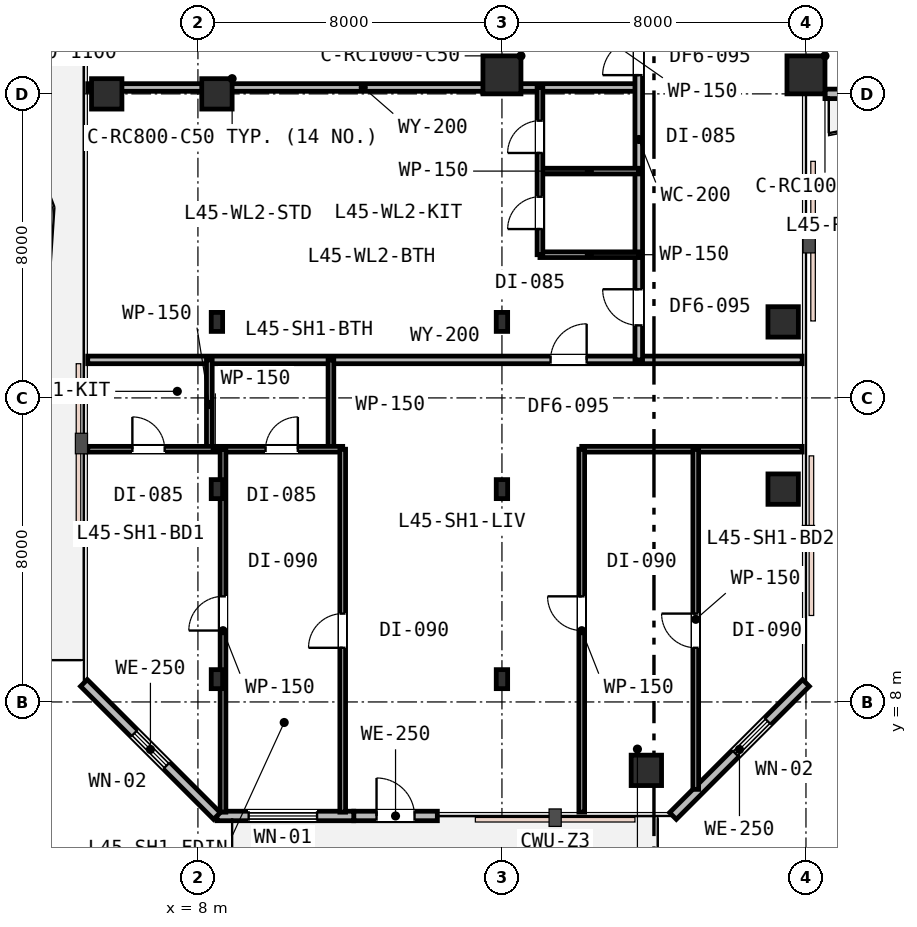
"""IFC4 building model, lengths in metres.
Left out: names, types, materials, properties, quantities, classifications, styles, units other than length and angle.
Written with IfcOpenShell. Run it as: python <this file> out.ifc"""

import sys

from ifc_helpers import new_model, si_unit, direction, frame, frame_2d, origin, origin_2d, place, context, subcontext, project, spatial, rectangle, i_section, extrude, element, fill, save


model = new_model("IFC4")
c1 = context("Model", 3, precision=1e-05, world=origin(), true_north=direction((0.0, 1.0)))
c2 = subcontext(c1, "Body", "Model", "MODEL_VIEW")
j1 = project(units=[si_unit("LENGTHUNIT", "METRE"), si_unit("PLANEANGLEUNIT", "RADIAN")], contexts=[c1])
p1 = place(None, origin())
s1 = spatial("IfcSite", under=j1, at=p1, CompositionType="ELEMENT")
p2 = place(p1, origin())
s2 = spatial("IfcBuilding", under=s1, at=p2, CompositionType="ELEMENT")
p3 = place(p2, frame((0.0, 0.0, 175.8)))
s3 = spatial("IfcBuildingStorey", under=s2, at=p3, CompositionType="ELEMENT", Elevation=175.8)
p4 = place(p3, frame((8.5, 24.0, 0.0), z_axis=(0.0, 0.0, 1.0), x_axis=(1.0, 0.0, 0.0)))
e1 = element("IfcColumn", 1, at=p4, inside=s3, PredefinedType="COLUMN", context=c2, shape_type="SweptSolid", body=[
    extrude(rectangle(XDim=0.8, YDim=0.8, at=origin_2d()), origin(), (0.0, 0.0, 1.0), 3.6),
])
for number, where, z_axis, x_axis in (
    (2, (16.0, 24.5, 0.0), (0.0, 0.0, 1.0), (1.0, 0.0, 0.0)),
    (3, (24.0, 24.5, 0.0), (0.0, 0.0, 1.0), (1.0, 0.0, 0.0)),
):
    element("IfcColumn", number, at=place(p3, frame(where, z_axis=z_axis, x_axis=x_axis)), inside=s3, PredefinedType="COLUMN", context=c2, shape_type="SweptSolid", body=[
        extrude(rectangle(XDim=1.0, YDim=1.0, at=origin_2d()), origin(), (0.0, 0.0, 1.0), 3.6),
    ])
for number, where, z_axis, x_axis in (
    (4, (5.6, 24.0, 0.0), (0.0, 0.0, 1.0), (1.0, 0.0, 0.0)),
    (5, (19.8, 6.2, 0.0), (0.0, 0.0, 1.0), (1.0, 0.0, 0.0)),
    (6, (23.4, 13.6, 0.0), (0.0, 0.0, 1.0), (1.0, 0.0, 0.0)),
    (7, (23.4, 18.0, 0.0), (0.0, 0.0, 1.0), (1.0, 0.0, 0.0)),
):
    element("IfcColumn", number, at=place(p3, frame(where, z_axis=z_axis, x_axis=x_axis)), inside=s3, PredefinedType="COLUMN", context=c2, shape_type="SweptSolid", body=[
        extrude(rectangle(XDim=0.8, YDim=0.8, at=origin_2d()), origin(), (0.0, 0.0, 1.0), 3.6),
    ])
for number, where, z_axis, x_axis in (
    (8, (8.5, 8.6, 0.0), (0.0, 0.0, 1.0), (1.0, 0.0, 0.0)),
    (9, (16.0, 8.6, 0.0), (0.0, 0.0, 1.0), (1.0, 0.0, 0.0)),
    (10, (8.5, 13.6, 0.0), (0.0, 0.0, 1.0), (1.0, 0.0, 0.0)),
    (11, (16.0, 13.6, 0.0), (0.0, 0.0, 1.0), (1.0, 0.0, 0.0)),
    (12, (8.5, 18.0, 0.0), (0.0, 0.0, 1.0), (1.0, 0.0, 0.0)),
    (13, (16.0, 18.0, 0.0), (0.0, 0.0, 1.0), (1.0, 0.0, 0.0)),
):
    element("IfcColumn", number, at=place(p3, frame(where, z_axis=z_axis, x_axis=x_axis)), inside=s3, PredefinedType="COLUMN", context=c2, shape_type="SweptSolid", body=[
        extrude(i_section(OverallWidth=0.3, OverallDepth=0.5, WebThickness=0.015, FlangeThickness=0.028, FilletRadius=0.027, at=origin_2d()), origin(), (0.0, 0.0, 1.0), 3.6),
    ])
p5 = place(p3, frame((12.1, 5.0, 0.0), z_axis=(0.0, 0.0, 1.0), x_axis=(1.0, 0.0, 0.0)))
e14 = element("IfcWall", 14, at=p5, inside=s3, PredefinedType="STANDARD", context=c2, shape_type="SweptSolid", body=[
    extrude(rectangle(XDim=2.2, YDim=0.25, at=frame_2d((1.1, 0.0))), origin(), (0.0, 0.0, 1.0), 3.33),
])
p6 = place(p5, frame((0.6, 0.0, 0.0)))
e15 = element("IfcOpeningElement", 15, at=p6, cuts=e14, PredefinedType="OPENING", context=c2, shape_type="SweptSolid", body=[
    extrude(rectangle(XDim=1.0, YDim=2.15, at=frame_2d((0.5, 1.075))), frame((0.0, 0.135, 0.0), z_axis=(0.0, -1.0, 0.0), x_axis=(1.0, 0.0, 0.0)), (0.0, 0.0, 1.0), 0.27),
])
p7 = place(p3, frame((8.5, 5.0, 0.0), z_axis=(0.0, 0.0, 1.0), x_axis=(1.0, 0.0, 0.0)))
e16 = element("IfcWall", 16, at=p7, inside=s3, PredefinedType="STANDARD", context=c2, shape_type="SweptSolid", body=[
    extrude(rectangle(XDim=3.6, YDim=0.25, at=frame_2d((1.8, 0.0))), origin(), (0.0, 0.0, 1.0), 3.33),
])
p8 = place(p7, frame((0.835, 0.0, 0.75)))
e17 = element("IfcOpeningElement", 17, at=p8, cuts=e16, PredefinedType="OPENING", context=c2, shape_type="SweptSolid", body=[
    extrude(rectangle(XDim=1.8, YDim=1.85, at=frame_2d((0.9, 0.925))), frame((0.0, 0.135, 0.0), z_axis=(0.0, -1.0, 0.0), x_axis=(1.0, 0.0, 0.0)), (0.0, 0.0, 1.0), 0.27),
])
p9 = place(p3, frame((20.5, 5.0, 0.0), z_axis=(0.0, 0.0, 1.0), x_axis=(0.707106781187, 0.707106781187, 0.0)))
e18 = element("IfcWall", 18, at=p9, inside=s3, PredefinedType="STANDARD", context=c2, shape_type="SweptSolid", body=[
    extrude(rectangle(XDim=4.95, YDim=0.25, at=frame_2d((2.475, 0.0))), origin(), (0.0, 0.0, 1.0), 3.33),
])
p10 = place(p9, frame((2.325, 0.0, 0.85)))
e19 = element("IfcOpeningElement", 19, at=p10, cuts=e18, PredefinedType="OPENING", context=c2, shape_type="SweptSolid", body=[
    extrude(rectangle(XDim=1.2, YDim=1.6, at=frame_2d((0.6, 0.8))), frame((0.0, 0.135, 0.0), z_axis=(0.0, -1.0, 0.0), x_axis=(1.0, 0.0, 0.0)), (0.0, 0.0, 1.0), 0.27),
])
p11 = place(p3, frame((24.5, 24.0, 0.0), z_axis=(0.0, 0.0, 1.0), x_axis=(1.0, 0.0, 0.0)))
e20 = element("IfcWall", 20, at=p11, inside=s3, PredefinedType="STANDARD", context=c2, shape_type="SweptSolid", body=[
    extrude(rectangle(XDim=1.35, YDim=0.25, at=frame_2d((0.675, 0.0))), origin(), (0.0, 0.0, 1.0), 3.02),
])
p12 = place(p3, frame((5.0, 8.5, 0.0), z_axis=(0.0, 0.0, 1.0), x_axis=(0.707106781187, -0.707106781187, 0.0)))
e21 = element("IfcWall", 21, at=p12, inside=s3, PredefinedType="STANDARD", context=c2, shape_type="SweptSolid", body=[
    extrude(rectangle(XDim=4.95, YDim=0.25, at=frame_2d((2.475, 0.0))), origin(), (0.0, 0.0, 1.0), 3.33),
])
p13 = place(p12, frame((1.875, 0.0, 0.85)))
e22 = element("IfcOpeningElement", 22, at=p13, cuts=e21, PredefinedType="OPENING", context=c2, shape_type="SweptSolid", body=[
    extrude(rectangle(XDim=1.2, YDim=1.6, at=frame_2d((0.6, 0.8))), frame((0.0, 0.135, 0.0), z_axis=(0.0, -1.0, 0.0), x_axis=(1.0, 0.0, 0.0)), (0.0, 0.0, 1.0), 0.27),
])
p14 = place(p3, frame((5.1, 17.0, 0.0), z_axis=(0.0, 0.0, 1.0), x_axis=(1.0, 0.0, 0.0)))
e23 = element("IfcWall", 23, at=p14, inside=s3, PredefinedType="PARTITIONING", context=c2, shape_type="SweptSolid", body=[
    extrude(rectangle(XDim=18.8, YDim=0.2, at=frame_2d((9.4, 0.0))), origin(), (0.0, 0.0, 1.0), 2.92),
])
p15 = place(p14, frame((12.179, 0.0, 0.0)))
e24 = element("IfcOpeningElement", 24, at=p15, cuts=e23, PredefinedType="OPENING", context=c2, shape_type="SweptSolid", body=[
    extrude(rectangle(XDim=0.95, YDim=2.15, at=frame_2d((0.475, 1.075))), frame((0.0, 0.11, 0.0), z_axis=(0.0, -1.0, 0.0), x_axis=(1.0, 0.0, 0.0)), (0.0, 0.0, 1.0), 0.22),
])
p16 = place(p3, frame((5.1, 24.168, 0.0), z_axis=(0.0, 0.0, 1.0), x_axis=(1.0, 0.0, 0.0)))
e25 = element("IfcWall", 25, at=p16, inside=s3, PredefinedType="PARTITIONING", context=c2, shape_type="SweptSolid", body=[
    extrude(rectangle(XDim=14.5, YDim=0.2, at=frame_2d((7.25, 0.0))), origin(), (0.0, 0.0, 1.0), 2.92),
])
p17 = place(p3, frame((19.6, 17.0, 0.0), z_axis=(0.0, 0.0, 1.0), x_axis=(0.0, 1.0, 0.0)))
e26 = element("IfcWall", 26, at=p17, inside=s3, PredefinedType="PARTITIONING", context=c2, shape_type="SweptSolid", body=[
    extrude(rectangle(XDim=11.6, YDim=0.2, at=frame_2d((5.8, 0.0))), origin(), (0.0, 0.0, 1.0), 2.92),
])
p18 = place(p17, frame((7.493, 0.0, 0.0)))
e27 = element("IfcOpeningElement", 27, at=p18, cuts=e26, PredefinedType="OPENING", context=c2, shape_type="SweptSolid", body=[
    extrude(rectangle(XDim=0.95, YDim=2.15, at=frame_2d((0.475, 1.075))), frame((0.0, 0.11, 0.0), z_axis=(0.0, -1.0, 0.0), x_axis=(1.0, 0.0, 0.0)), (0.0, 0.0, 1.0), 0.22),
])
p19 = place(p17, frame((0.909, 0.0, 0.0)))
e28 = element("IfcOpeningElement", 28, at=p19, cuts=e26, PredefinedType="OPENING", context=c2, shape_type="SweptSolid", body=[
    extrude(rectangle(XDim=0.95, YDim=2.15, at=frame_2d((0.475, 1.075))), frame((0.0, 0.11, 0.0), z_axis=(0.0, -1.0, 0.0), x_axis=(1.0, 0.0, 0.0)), (0.0, 0.0, 1.0), 0.22),
])
for number, where, z_axis, x_axis in (
    (29, (17.0, 19.768, 0.0), (0.0, 0.0, 1.0), (1.0, 0.0, 0.0)),
    (30, (17.0, 21.968, 0.0), (0.0, 0.0, 1.0), (1.0, 0.0, 0.0)),
):
    element("IfcWall", number, at=place(p3, frame(where, z_axis=z_axis, x_axis=x_axis)), inside=s3, PredefinedType="PARTITIONING", context=c2, shape_type="SweptSolid", body=[
        extrude(rectangle(XDim=2.6, YDim=0.15, at=frame_2d((1.3, 0.0))), origin(), (0.0, 0.0, 1.0), 3.33),
    ])
p20 = place(p3, frame((17.0, 19.768, 0.0), z_axis=(0.0, 0.0, 1.0), x_axis=(0.0, 1.0, 0.0)))
e31 = element("IfcWall", 31, at=p20, inside=s3, PredefinedType="PARTITIONING", context=c2, shape_type="SweptSolid", body=[
    extrude(rectangle(XDim=4.4, YDim=0.15, at=frame_2d((2.2, 0.0))), origin(), (0.0, 0.0, 1.0), 2.92),
])
p21 = place(p20, frame((0.675, 0.0, 0.0)))
e32 = element("IfcOpeningElement", 32, at=p21, cuts=e31, PredefinedType="OPENING", context=c2, shape_type="SweptSolid", body=[
    extrude(rectangle(XDim=0.85, YDim=2.15, at=frame_2d((0.425, 1.075))), frame((0.0, 0.085, 0.0), z_axis=(0.0, -1.0, 0.0), x_axis=(1.0, 0.0, 0.0)), (0.0, 0.0, 1.0), 0.17),
])
p22 = place(p20, frame((2.677, 0.0, 0.0)))
e33 = element("IfcOpeningElement", 33, at=p22, cuts=e31, PredefinedType="OPENING", context=c2, shape_type="SweptSolid", body=[
    extrude(rectangle(XDim=0.85, YDim=2.15, at=frame_2d((0.425, 1.075))), frame((0.0, 0.085, 0.0), z_axis=(0.0, -1.0, 0.0), x_axis=(1.0, 0.0, 0.0)), (0.0, 0.0, 1.0), 0.17),
])
p23 = place(p3, frame((11.5, 14.65, 0.0), z_axis=(0.0, 0.0, 1.0), x_axis=(0.0, 1.0, 0.0)))
e34 = element("IfcWall", 34, at=p23, inside=s3, PredefinedType="PARTITIONING", context=c2, shape_type="SweptSolid", body=[
    extrude(rectangle(XDim=2.35, YDim=0.15, at=frame_2d((1.175, 0.0))), origin(), (0.0, 0.0, 1.0), 3.07),
])
p24 = place(p3, frame((8.3, 14.65, 0.0), z_axis=(0.0, 0.0, 1.0), x_axis=(0.0, 1.0, 0.0)))
e35 = element("IfcWall", 35, at=p24, inside=s3, PredefinedType="PARTITIONING", context=c2, shape_type="SweptSolid", body=[
    extrude(rectangle(XDim=2.35, YDim=0.15, at=frame_2d((1.175, 0.0))), origin(), (0.0, 0.0, 1.0), 2.92),
])
p25 = place(p3, frame((5.1, 14.65, 0.0), z_axis=(0.0, 0.0, 1.0), x_axis=(1.0, 0.0, 0.0)))
e36 = element("IfcWall", 36, at=p25, inside=s3, PredefinedType="PARTITIONING", context=c2, shape_type="SweptSolid", body=[
    extrude(rectangle(XDim=6.71, YDim=0.15, at=frame_2d((3.355, 0.0))), origin(), (0.0, 0.0, 1.0), 2.92),
])
p26 = place(p25, frame((1.175, 0.0, 0.0)))
e37 = element("IfcOpeningElement", 37, at=p26, cuts=e36, PredefinedType="OPENING", context=c2, shape_type="SweptSolid", body=[
    extrude(rectangle(XDim=0.85, YDim=2.15, at=frame_2d((0.425, 1.075))), frame((0.0, 0.085, 0.0), z_axis=(0.0, -1.0, 0.0), x_axis=(1.0, 0.0, 0.0)), (0.0, 0.0, 1.0), 0.17),
])
p27 = place(p25, frame((4.679, 0.0, 0.0)))
e38 = element("IfcOpeningElement", 38, at=p27, cuts=e36, PredefinedType="OPENING", context=c2, shape_type="SweptSolid", body=[
    extrude(rectangle(XDim=0.85, YDim=2.15, at=frame_2d((0.425, 1.075))), frame((0.0, 0.085, 0.0), z_axis=(0.0, -1.0, 0.0), x_axis=(1.0, 0.0, 0.0)), (0.0, 0.0, 1.0), 0.17),
])
p28 = place(p3, frame((18.1, 14.65, 0.0), z_axis=(0.0, 0.0, 1.0), x_axis=(1.0, 0.0, 0.0)))
e39 = element("IfcWall", 39, at=p28, inside=s3, PredefinedType="PARTITIONING", context=c2, shape_type="SweptSolid", body=[
    extrude(rectangle(XDim=5.8, YDim=0.15, at=frame_2d((2.9, 0.0))), origin(), (0.0, 0.0, 1.0), 3.02),
])
p29 = place(p3, frame((8.66, 5.1, 0.0), z_axis=(0.0, 0.0, 1.0), x_axis=(0.0, 1.0, 0.0)))
e40 = element("IfcWall", 40, at=p29, inside=s3, PredefinedType="PARTITIONING", context=c2, shape_type="SweptSolid", body=[
    extrude(rectangle(XDim=9.55, YDim=0.15, at=frame_2d((4.775, 0.0))), origin(), (0.0, 0.0, 1.0), 2.92),
])
p30 = place(p29, frame((4.779, 0.0, 0.0)))
e41 = element("IfcOpeningElement", 41, at=p30, cuts=e40, PredefinedType="OPENING", context=c2, shape_type="SweptSolid", body=[
    extrude(rectangle(XDim=0.9, YDim=2.15, at=frame_2d((0.45, 1.075))), frame((0.0, 0.085, 0.0), z_axis=(0.0, -1.0, 0.0), x_axis=(1.0, 0.0, 0.0)), (0.0, 0.0, 1.0), 0.17),
])
p31 = place(p3, frame((21.1, 5.7, 0.0), z_axis=(0.0, 0.0, 1.0), x_axis=(0.0, 1.0, 0.0)))
e42 = element("IfcWall", 42, at=p31, inside=s3, PredefinedType="PARTITIONING", context=c2, shape_type="SweptSolid", body=[
    extrude(rectangle(XDim=8.95, YDim=0.15, at=frame_2d((4.475, 0.0))), origin(), (0.0, 0.0, 1.0), 2.92),
])
p32 = place(p31, frame((3.725, 0.0, 0.0)))
e43 = element("IfcOpeningElement", 43, at=p32, cuts=e42, PredefinedType="OPENING", context=c2, shape_type="SweptSolid", body=[
    extrude(rectangle(XDim=0.9, YDim=2.15, at=frame_2d((0.45, 1.075))), frame((0.0, 0.085, 0.0), z_axis=(0.0, -1.0, 0.0), x_axis=(1.0, 0.0, 0.0)), (0.0, 0.0, 1.0), 0.17),
])
p33 = place(p3, frame((18.1, 5.1, 0.0), z_axis=(0.0, 0.0, 1.0), x_axis=(0.0, 1.0, 0.0)))
e44 = element("IfcWall", 44, at=p33, inside=s3, PredefinedType="PARTITIONING", context=c2, shape_type="SweptSolid", body=[
    extrude(rectangle(XDim=9.55, YDim=0.15, at=frame_2d((4.775, 0.0))), origin(), (0.0, 0.0, 1.0), 2.92),
])
p34 = place(p33, frame((4.779, 0.0, 0.0)))
e45 = element("IfcOpeningElement", 45, at=p34, cuts=e44, PredefinedType="OPENING", context=c2, shape_type="SweptSolid", body=[
    extrude(rectangle(XDim=0.9, YDim=2.15, at=frame_2d((0.45, 1.075))), frame((0.0, 0.085, 0.0), z_axis=(0.0, -1.0, 0.0), x_axis=(1.0, 0.0, 0.0)), (0.0, 0.0, 1.0), 0.17),
])
p35 = place(p3, frame((11.81, 5.1, 0.0), z_axis=(0.0, 0.0, 1.0), x_axis=(0.0, 1.0, 0.0)))
e46 = element("IfcWall", 46, at=p35, inside=s3, PredefinedType="PARTITIONING", context=c2, shape_type="SweptSolid", body=[
    extrude(rectangle(XDim=9.55, YDim=0.15, at=frame_2d((4.775, 0.0))), origin(), (0.0, 0.0, 1.0), 2.92),
])
p36 = place(p35, frame((4.325, 0.0, 0.0)))
e47 = element("IfcOpeningElement", 47, at=p36, cuts=e46, PredefinedType="OPENING", context=c2, shape_type="SweptSolid", body=[
    extrude(rectangle(XDim=0.9, YDim=2.15, at=frame_2d((0.45, 1.075))), frame((0.0, 0.085, 0.0), z_axis=(0.0, -1.0, 0.0), x_axis=(1.0, 0.0, 0.0)), (0.0, 0.0, 1.0), 0.17),
])
p37 = place(p6, origin())
e48 = element("IfcDoor", 48, at=p37, inside=s3, OperationType="SINGLE_SWING_LEFT", PredefinedType="DOOR", context=c2, shape_type="SweptSolid", body=[
    extrude(rectangle(XDim=1.0, YDim=2.15, at=frame_2d((0.5, 1.075))), frame((0.0, 0.025, 0.0), z_axis=(0.0, -1.0, 0.0), x_axis=(1.0, 0.0, 0.0)), (0.0, 0.0, 1.0), 0.05),
])
fill(e15, e48)
p38 = place(p8, origin())
e49 = element("IfcWindow", 49, at=p38, inside=s3, PartitioningType="SINGLE_PANEL", PredefinedType="WINDOW", context=c2, shape_type="SweptSolid", body=[
    extrude(rectangle(XDim=1.8, YDim=1.85, at=frame_2d((0.9, 0.925))), frame((0.0, 0.03, 0.0), z_axis=(0.0, -1.0, 0.0), x_axis=(1.0, 0.0, 0.0)), (0.0, 0.0, 1.0), 0.06),
])
fill(e17, e49)
p39 = place(p10, origin())
e50 = element("IfcWindow", 50, at=p39, inside=s3, PartitioningType="SINGLE_PANEL", PredefinedType="WINDOW", context=c2, shape_type="SweptSolid", body=[
    extrude(rectangle(XDim=1.2, YDim=1.6, at=frame_2d((0.6, 0.8))), frame((0.0, 0.03, 0.0), z_axis=(0.0, -1.0, 0.0), x_axis=(1.0, 0.0, 0.0)), (0.0, 0.0, 1.0), 0.06),
])
fill(e19, e50)
p40 = place(p13, origin())
e51 = element("IfcWindow", 51, at=p40, inside=s3, PartitioningType="SINGLE_PANEL", PredefinedType="WINDOW", context=c2, shape_type="SweptSolid", body=[
    extrude(rectangle(XDim=1.2, YDim=1.6, at=frame_2d((0.6, 0.8))), frame((0.0, 0.03, 0.0), z_axis=(0.0, -1.0, 0.0), x_axis=(1.0, 0.0, 0.0)), (0.0, 0.0, 1.0), 0.06),
])
fill(e22, e51)
p41 = place(p18, origin())
e52 = element("IfcDoor", 52, at=p41, inside=s3, OperationType="SINGLE_SWING_LEFT", PredefinedType="DOOR", context=c2, shape_type="SweptSolid", body=[
    extrude(rectangle(XDim=0.95, YDim=2.15, at=frame_2d((0.475, 1.075))), frame((0.0, 0.025, 0.0), z_axis=(0.0, -1.0, 0.0), x_axis=(1.0, 0.0, 0.0)), (0.0, 0.0, 1.0), 0.05),
])
fill(e27, e52)
p42 = place(p19, origin())
e53 = element("IfcDoor", 53, at=p42, inside=s3, OperationType="SINGLE_SWING_RIGHT", PredefinedType="DOOR", context=c2, shape_type="SweptSolid", body=[
    extrude(rectangle(XDim=0.95, YDim=2.15, at=frame_2d((0.475, 1.075))), frame((0.0, 0.025, 0.0), z_axis=(0.0, -1.0, 0.0), x_axis=(1.0, 0.0, 0.0)), (0.0, 0.0, 1.0), 0.05),
])
fill(e28, e53)
p43 = place(p21, origin())
e54 = element("IfcDoor", 54, at=p43, inside=s3, OperationType="SINGLE_SWING_LEFT", PredefinedType="DOOR", context=c2, shape_type="SweptSolid", body=[
    extrude(rectangle(XDim=0.85, YDim=2.15, at=frame_2d((0.425, 1.075))), frame((0.0, 0.025, 0.0), z_axis=(0.0, -1.0, 0.0), x_axis=(1.0, 0.0, 0.0)), (0.0, 0.0, 1.0), 0.05),
])
fill(e32, e54)
p44 = place(p22, origin())
e55 = element("IfcDoor", 55, at=p44, inside=s3, OperationType="SINGLE_SWING_LEFT", PredefinedType="DOOR", context=c2, shape_type="SweptSolid", body=[
    extrude(rectangle(XDim=0.85, YDim=2.15, at=frame_2d((0.425, 1.075))), frame((0.0, 0.025, 0.0), z_axis=(0.0, -1.0, 0.0), x_axis=(1.0, 0.0, 0.0)), (0.0, 0.0, 1.0), 0.05),
])
fill(e33, e55)
p45 = place(p15, origin())
e56 = element("IfcDoor", 56, at=p45, inside=s3, OperationType="SINGLE_SWING_RIGHT", PredefinedType="DOOR", context=c2, shape_type="SweptSolid", body=[
    extrude(rectangle(XDim=0.95, YDim=2.15, at=frame_2d((0.475, 1.075))), frame((0.0, 0.025, 0.0), z_axis=(0.0, -1.0, 0.0), x_axis=(1.0, 0.0, 0.0)), (0.0, 0.0, 1.0), 0.05),
])
fill(e24, e56)
p46 = place(p26, origin())
e57 = element("IfcDoor", 57, at=p46, inside=s3, OperationType="SINGLE_SWING_LEFT", PredefinedType="DOOR", context=c2, shape_type="SweptSolid", body=[
    extrude(rectangle(XDim=0.85, YDim=2.15, at=frame_2d((0.425, 1.075))), frame((0.0, 0.025, 0.0), z_axis=(0.0, -1.0, 0.0), x_axis=(1.0, 0.0, 0.0)), (0.0, 0.0, 1.0), 0.05),
])
fill(e37, e57)
p47 = place(p27, origin())
e58 = element("IfcDoor", 58, at=p47, inside=s3, OperationType="SINGLE_SWING_RIGHT", PredefinedType="DOOR", context=c2, shape_type="SweptSolid", body=[
    extrude(rectangle(XDim=0.85, YDim=2.15, at=frame_2d((0.425, 1.075))), frame((0.0, 0.025, 0.0), z_axis=(0.0, -1.0, 0.0), x_axis=(1.0, 0.0, 0.0)), (0.0, 0.0, 1.0), 0.05),
])
fill(e38, e58)
p48 = place(p30, origin())
e59 = element("IfcDoor", 59, at=p48, inside=s3, OperationType="SINGLE_SWING_LEFT", PredefinedType="DOOR", context=c2, shape_type="SweptSolid", body=[
    extrude(rectangle(XDim=0.9, YDim=2.15, at=frame_2d((0.45, 1.075))), frame((0.0, 0.025, 0.0), z_axis=(0.0, -1.0, 0.0), x_axis=(1.0, 0.0, 0.0)), (0.0, 0.0, 1.0), 0.05),
])
fill(e41, e59)
p49 = place(p32, origin())
e60 = element("IfcDoor", 60, at=p49, inside=s3, OperationType="SINGLE_SWING_RIGHT", PredefinedType="DOOR", context=c2, shape_type="SweptSolid", body=[
    extrude(rectangle(XDim=0.9, YDim=2.15, at=frame_2d((0.45, 1.075))), frame((0.0, 0.025, 0.0), z_axis=(0.0, -1.0, 0.0), x_axis=(1.0, 0.0, 0.0)), (0.0, 0.0, 1.0), 0.05),
])
fill(e43, e60)
p50 = place(p34, origin())
e61 = element("IfcDoor", 61, at=p50, inside=s3, OperationType="SINGLE_SWING_RIGHT", PredefinedType="DOOR", context=c2, shape_type="SweptSolid", body=[
    extrude(rectangle(XDim=0.9, YDim=2.15, at=frame_2d((0.45, 1.075))), frame((0.0, 0.025, 0.0), z_axis=(0.0, -1.0, 0.0), x_axis=(1.0, 0.0, 0.0)), (0.0, 0.0, 1.0), 0.05),
])
fill(e45, e61)
p51 = place(p36, origin())
e62 = element("IfcDoor", 62, at=p51, inside=s3, OperationType="SINGLE_SWING_LEFT", PredefinedType="DOOR", context=c2, shape_type="SweptSolid", body=[
    extrude(rectangle(XDim=0.9, YDim=2.15, at=frame_2d((0.45, 1.075))), frame((0.0, 0.025, 0.0), z_axis=(0.0, -1.0, 0.0), x_axis=(1.0, 0.0, 0.0)), (0.0, 0.0, 1.0), 0.05),
])
fill(e47, e62)
save(model, sys.argv[1])
